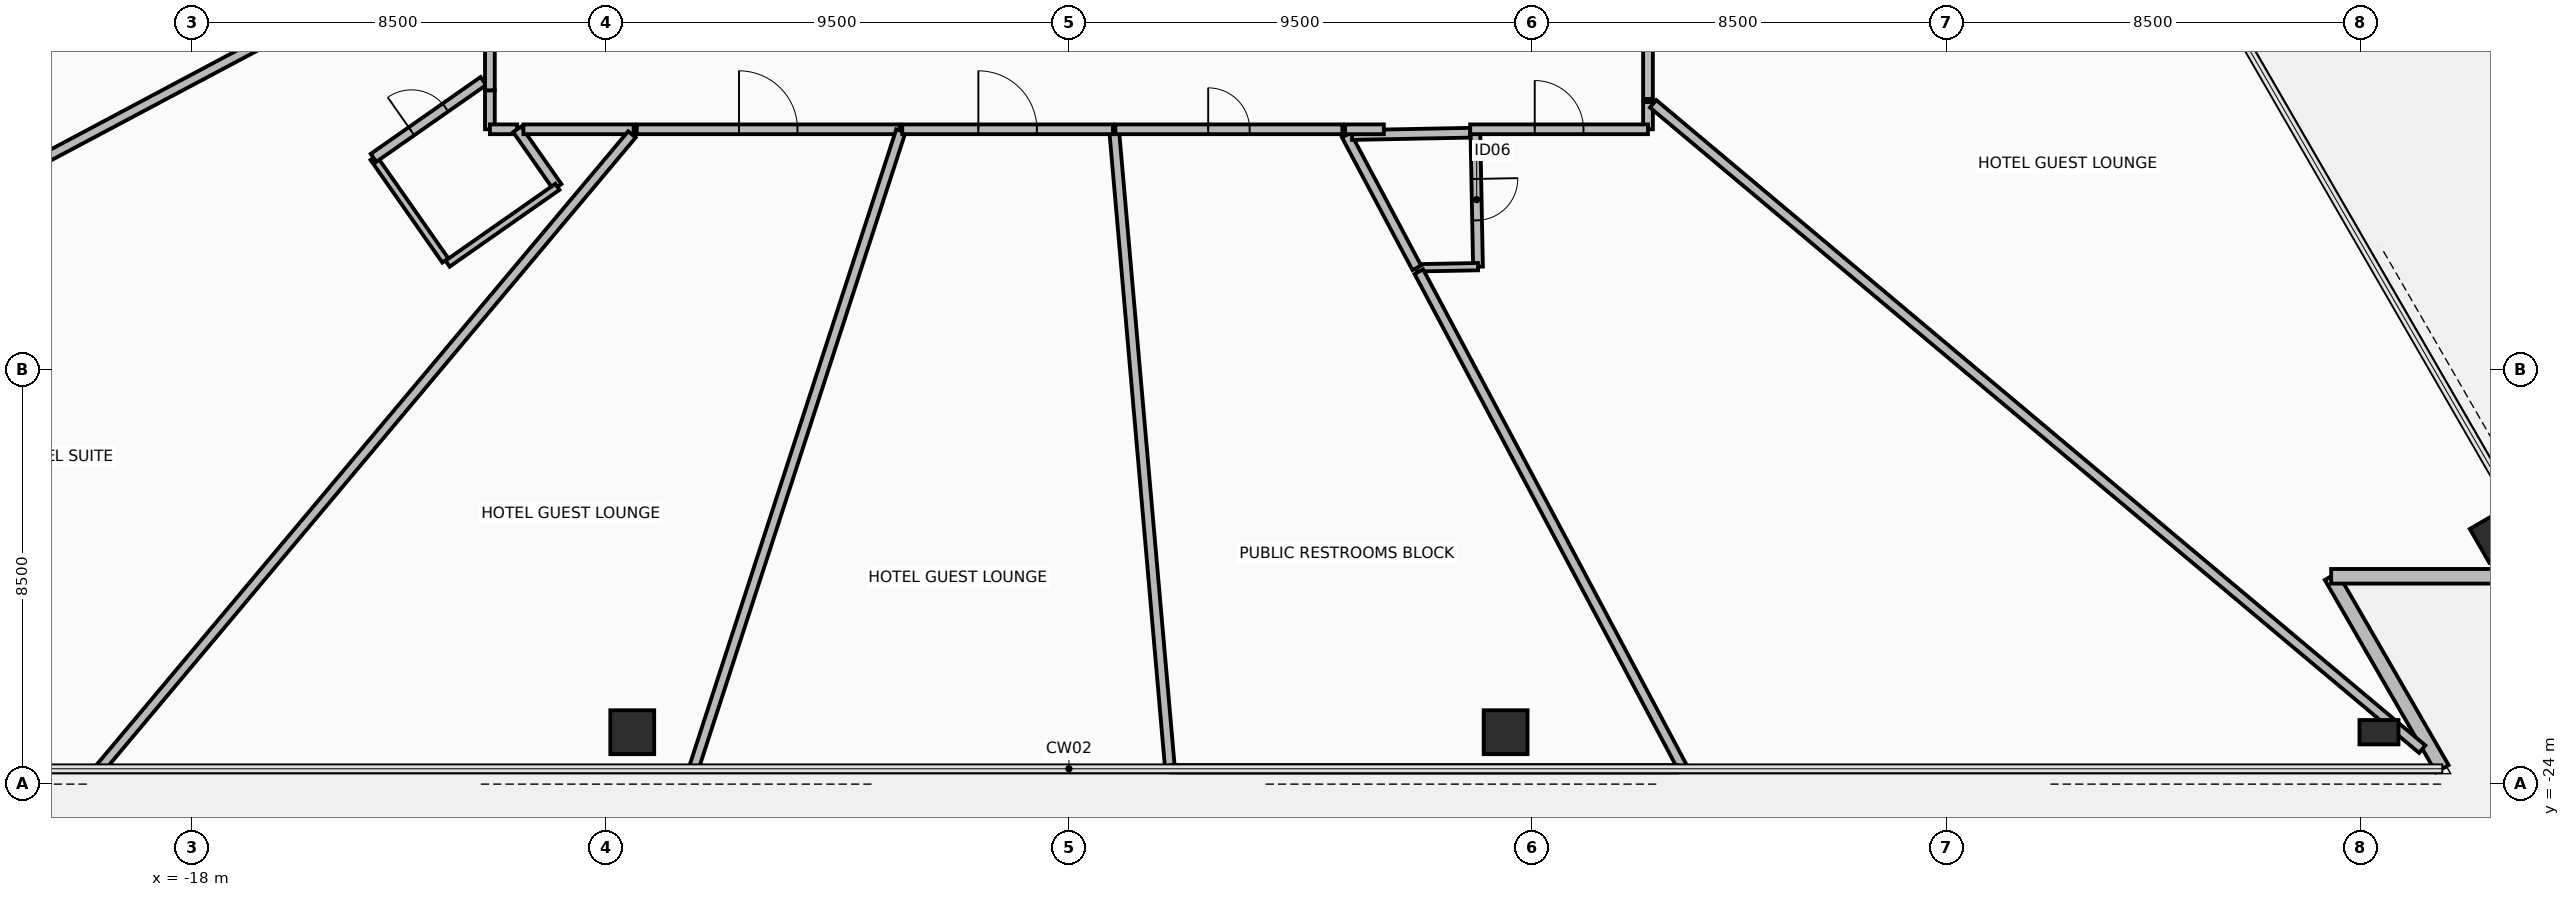
"""IFC4 building model, lengths in metres.
Left out: names, types, materials, properties, quantities, classifications, styles, units other than length and angle.
Written with IfcOpenShell. Run it as: python <this file> out.ifc"""

import sys

from ifc_helpers import new_model, si_unit, direction, frame, frame_2d, origin, origin_2d, place, context, subcontext, project, spatial, rectangle, hollow_rectangle, extrude, element, fill, save


model = new_model("IFC4")
c1 = context("Model", 3, precision=1e-05, world=origin(), true_north=direction((0.0, 1.0)))
c2 = subcontext(c1, "Body", "Model", "MODEL_VIEW")
j1 = project(units=[si_unit("LENGTHUNIT", "METRE"), si_unit("PLANEANGLEUNIT", "RADIAN")], contexts=[c1])
p1 = place(None, origin())
s1 = spatial("IfcSite", under=j1, at=p1, CompositionType="ELEMENT")
p2 = place(p1, origin())
s2 = spatial("IfcBuilding", under=s1, at=p2, CompositionType="ELEMENT")
p3 = place(p2, frame((0.0, 0.0, 31.8)))
s3 = spatial("IfcBuildingStorey", under=s2, at=p3, CompositionType="ELEMENT", Elevation=31.8)
for number, where, z_axis, x_axis in (
    (1, (-8.959, -22.95, 0.0), (0.0, 0.0, 1.0), (1.0, 0.0, 0.0)),
    (2, (8.959, -22.95, 0.0), (0.0, 0.0, 1.0), (1.0, 0.0, 0.0)),
):
    element("IfcColumn", number, at=place(p3, frame(where, z_axis=z_axis, x_axis=x_axis)), inside=s3, PredefinedType="COLUMN", context=c2, shape_type="SweptSolid", body=[
        extrude(hollow_rectangle(XDim=0.9, YDim=0.9, WallThickness=0.05, at=origin_2d()), origin(), (0.0, 0.0, 1.0), 3.45),
    ])
for number, where, z_axis, x_axis in (
    (3, (26.877, -22.95, 0.0), (0.0, 0.0, 1.0), (1.0, 0.0, 0.0)),
    (4, (29.157, -19.001, 0.0), (0.0, 0.0, 1.0), (-0.5, 0.866, 0.0)),
):
    element("IfcColumn", number, at=place(p3, frame(where, z_axis=z_axis, x_axis=x_axis)), inside=s3, PredefinedType="COLUMN", context=c2, shape_type="SweptSolid", body=[
        extrude(hollow_rectangle(XDim=0.5, YDim=0.8, WallThickness=0.04, at=origin_2d()), origin(), (0.0, 0.0, 1.0), 3.45),
    ])
p4 = place(p3, frame((-3.8, 26.418, 0.0), z_axis=(0.0, 0.0, 1.0), x_axis=(-0.499999546436, -0.86602566565, 0.0)))
e5 = element("IfcWall", 5, at=p4, inside=s3, PredefinedType="STANDARD", context=c2, shape_type="SweptSolid", body=[
    extrude(rectangle(XDim=53.312, YDim=0.3, at=frame_2d((26.656, 0.0))), origin(), (0.0, 0.0, 1.0), 3.275),
])
p5 = place(p4, frame((25.756, 0.0, 0.0)))
e6 = element("IfcOpeningElement", 6, at=p5, cuts=e5, PredefinedType="OPENING", context=c2, shape_type="SweptSolid", body=[
    extrude(rectangle(XDim=1.8, YDim=2.3, at=frame_2d((0.9, 1.15))), frame((0.0, 0.16, 0.0), z_axis=(0.0, -1.0, 0.0), x_axis=(1.0, 0.0, 0.0)), (0.0, 0.0, 1.0), 0.32),
])
p6 = place(p4, frame((12.578, 0.0, 0.85)))
e7 = element("IfcOpeningElement", 7, at=p6, cuts=e5, PredefinedType="OPENING", context=c2, shape_type="SweptSolid", body=[
    extrude(rectangle(XDim=1.5, YDim=2.1, at=frame_2d((0.75, 1.05))), frame((0.0, 0.16, 0.0), z_axis=(0.0, -1.0, 0.0), x_axis=(1.0, 0.0, 0.0)), (0.0, 0.0, 1.0), 0.32),
])
p7 = place(p4, frame((39.234, 0.0, 0.85)))
e8 = element("IfcOpeningElement", 8, at=p7, cuts=e5, PredefinedType="OPENING", context=c2, shape_type="SweptSolid", body=[
    extrude(rectangle(XDim=1.5, YDim=2.1, at=frame_2d((0.75, 1.05))), frame((0.0, 0.16, 0.0), z_axis=(0.0, -1.0, 0.0), x_axis=(1.0, 0.0, 0.0)), (0.0, 0.0, 1.0), 0.32),
])
p8 = place(p3, frame((28.176, -23.7, 0.0), z_axis=(0.0, 0.0, 1.0), x_axis=(-0.500014431597, 0.866017071537, 0.0)))
e9 = element("IfcWall", 9, at=p8, inside=s3, PredefinedType="STANDARD", context=c2, shape_type="SweptSolid", body=[
    extrude(rectangle(XDim=4.56, YDim=0.3, at=frame_2d((2.28, 0.0))), origin(), (0.0, 0.0, 1.0), 2.47),
])
p9 = place(p3, frame((25.896, -19.751, 0.0), z_axis=(0.0, 0.0, 1.0), x_axis=(1.0, 0.0, 0.0)))
e10 = element("IfcWall", 10, at=p9, inside=s3, PredefinedType="STANDARD", context=c2, shape_type="SweptSolid", body=[
    extrude(rectangle(XDim=4.56, YDim=0.3, at=frame_2d((2.28, 0.0))), origin(), (0.0, 0.0, 1.0), 2.47),
])
p10 = place(p3, frame((-11.88, -9.78, 0.0), z_axis=(0.0, 0.0, 1.0), x_axis=(0.0, -1.0, 0.0)))
e11 = element("IfcWall", 11, at=p10, inside=s3, PredefinedType="PARTITIONING", context=c2, shape_type="SweptSolid", body=[
    extrude(rectangle(XDim=0.8, YDim=0.2, at=frame_2d((0.4, 0.0))), origin(), (0.0, 0.0, 1.0), 2.67),
])
p11 = place(p3, frame((-11.879, -10.58, 0.0), z_axis=(0.0, 0.0, 1.0), x_axis=(1.0, 0.0, 0.0)))
e12 = element("IfcWall", 12, at=p11, inside=s3, PredefinedType="PARTITIONING", context=c2, shape_type="SweptSolid", body=[
    extrude(rectangle(XDim=0.559, YDim=0.2, at=frame_2d((0.28, 0.0))), origin(), (0.0, 0.0, 1.0), 3.275),
])
p12 = place(p3, frame((-11.32, -10.58, 0.0), z_axis=(0.0, 0.0, 1.0), x_axis=(0.573177949093, -0.819430923674, 0.0)))
e13 = element("IfcWall", 13, at=p12, inside=s3, PredefinedType="PARTITIONING", context=c2, shape_type="SweptSolid", body=[
    extrude(rectangle(XDim=1.44, YDim=0.2, at=frame_2d((0.72, 0.0))), origin(), (0.0, 0.0, 1.0), 3.275),
])
p13 = place(p3, frame((-10.494, -11.76, 0.0), z_axis=(0.0, 0.0, 1.0), x_axis=(-0.819398712469, -0.573223996361, 0.0)))
e14 = element("IfcWall", 14, at=p13, inside=s3, PredefinedType="PARTITIONING", context=c2, shape_type="SweptSolid", body=[
    extrude(rectangle(XDim=2.75, YDim=0.15, at=frame_2d((1.375, 0.0))), origin(), (0.0, 0.0, 1.0), 3.275),
])
p14 = place(p3, frame((-12.794, -13.271, 0.0), z_axis=(0.0, 0.0, 1.0), x_axis=(-0.573130756233, 0.819463932251, 0.0)))
e15 = element("IfcWall", 15, at=p14, inside=s3, PredefinedType="PARTITIONING", context=c2, shape_type="SweptSolid", body=[
    extrude(rectangle(XDim=2.57, YDim=0.15, at=frame_2d((1.285, 0.0))), origin(), (0.0, 0.0, 1.0), 2.67),
])
p15 = place(p3, frame((-14.267, -11.165, 0.0), z_axis=(0.0, 0.0, 1.0), x_axis=(0.81944041023, 0.573164386614, 0.0)))
e16 = element("IfcWall", 16, at=p15, inside=s3, PredefinedType="PARTITIONING", context=c2, shape_type="SweptSolid", body=[
    extrude(rectangle(XDim=2.75, YDim=0.2, at=frame_2d((1.375, 0.0))), origin(), (0.0, 0.0, 1.0), 2.67),
])
p16 = place(p15, frame((0.95, 0.0, 0.0)))
e17 = element("IfcOpeningElement", 17, at=p16, cuts=e16, PredefinedType="OPENING", context=c2, shape_type="SweptSolid", body=[
    extrude(rectangle(XDim=0.85, YDim=2.1, at=frame_2d((0.425, 1.05))), frame((0.0, 0.11, 0.0), z_axis=(0.0, -1.0, 0.0), x_axis=(1.0, 0.0, 0.0)), (0.0, 0.0, 1.0), 0.22),
])
p17 = place(p3, frame((8.339, -10.649, 0.0), z_axis=(0.0, 0.0, 1.0), x_axis=(0.019353504647, -0.999812703389, 0.0)))
e18 = element("IfcWall", 18, at=p17, inside=s3, PredefinedType="PARTITIONING", context=c2, shape_type="SweptSolid", body=[
    extrude(rectangle(XDim=2.75, YDim=0.2, at=frame_2d((1.375, 0.0))), origin(), (0.0, 0.0, 1.0), 3.275),
])
p18 = place(p17, frame((0.95, 0.0, 0.0)))
e19 = element("IfcOpeningElement", 19, at=p18, cuts=e18, PredefinedType="OPENING", context=c2, shape_type="SweptSolid", body=[
    extrude(rectangle(XDim=0.85, YDim=2.1, at=frame_2d((0.425, 1.05))), frame((0.0, 0.11, 0.0), z_axis=(0.0, -1.0, 0.0), x_axis=(1.0, 0.0, 0.0)), (0.0, 0.0, 1.0), 0.22),
])
p19 = place(p3, frame((8.392, -13.398, 0.0), z_axis=(0.0, 0.0, 1.0), x_axis=(-0.999810947385, -0.01944400909, 0.0)))
e20 = element("IfcWall", 20, at=p19, inside=s3, PredefinedType="PARTITIONING", context=c2, shape_type="SweptSolid", body=[
    extrude(rectangle(XDim=1.256, YDim=0.15, at=frame_2d((0.628, 0.0))), origin(), (0.0, 0.0, 1.0), 3.275),
])
p20 = place(p3, frame((7.137, -13.423, 0.0), z_axis=(0.0, 0.0, 1.0), x_axis=(-0.46943307166, 0.882968057877, 0.0)))
e21 = element("IfcWall", 21, at=p20, inside=s3, PredefinedType="PARTITIONING", context=c2, shape_type="SweptSolid", body=[
    extrude(rectangle(XDim=3.083, YDim=0.2, at=frame_2d((1.542, 0.0))), origin(), (0.0, 0.0, 1.0), 3.275),
])
p21 = place(p3, frame((5.807, -10.698, 0.0), z_axis=(0.0, 0.0, 1.0), x_axis=(0.999811590966, 0.019410887945, 0.0)))
e22 = element("IfcWall", 22, at=p21, inside=s3, PredefinedType="PARTITIONING", context=c2, shape_type="SweptSolid", body=[
    extrude(rectangle(XDim=2.427, YDim=0.2, at=frame_2d((1.214, 0.0))), origin(), (0.0, 0.0, 1.0), 3.275),
])
p22 = place(p3, frame((-11.893, -6.324, 0.0), z_axis=(0.0, 0.0, 1.0), x_axis=(-0.882947372325, -0.46947197755, 0.0)))
e23 = element("IfcWall", 23, at=p22, inside=s3, PredefinedType="PARTITIONING", context=c2, shape_type="SweptSolid", body=[
    extrude(rectangle(XDim=17.374, YDim=0.2, at=frame_2d((8.687, 0.0))), origin(), (0.0, 0.0, 1.0), 2.47),
])
p23 = place(p3, frame((2.072, -23.677, 0.0), z_axis=(0.0, 0.0, 1.0), x_axis=(-0.087161179376, 0.996194222433, 0.0)))
e24 = element("IfcWall", 24, at=p23, inside=s3, PredefinedType="PARTITIONING", context=c2, shape_type="SweptSolid", body=[
    extrude(rectangle(XDim=13.12, YDim=0.2, at=frame_2d((6.56, 0.0))), origin(), (0.0, 0.0, 1.0), 2.47),
])
p24 = place(p3, frame((0.953, -10.58, 0.0), z_axis=(0.0, 0.0, 1.0), x_axis=(1.0, 0.0, 0.0)))
e25 = element("IfcWall", 25, at=p24, inside=s3, PredefinedType="PARTITIONING", context=c2, shape_type="SweptSolid", body=[
    extrude(rectangle(XDim=4.658, YDim=0.2, at=frame_2d((2.329, 0.0))), origin(), (0.0, 0.0, 1.0), 3.275),
])
p25 = place(p24, frame((1.904, 0.0, 0.0)))
e26 = element("IfcOpeningElement", 26, at=p25, cuts=e25, PredefinedType="OPENING", context=c2, shape_type="SweptSolid", body=[
    extrude(rectangle(XDim=0.85, YDim=2.1, at=frame_2d((0.425, 1.05))), frame((0.0, 0.11, 0.0), z_axis=(0.0, -1.0, 0.0), x_axis=(1.0, 0.0, 0.0)), (0.0, 0.0, 1.0), 0.22),
])
p26 = place(p3, frame((7.179, -13.502, 0.0), z_axis=(0.0, 0.0, 1.0), x_axis=(0.469478708188, -0.882943793544, 0.0)))
e27 = element("IfcWall", 27, at=p26, inside=s3, PredefinedType="PARTITIONING", context=c2, shape_type="SweptSolid", body=[
    extrude(rectangle(XDim=11.55, YDim=0.2, at=frame_2d((5.775, 0.0))), origin(), (0.0, 0.0, 1.0), 2.47),
])
p27 = place(p3, frame((12.483, -23.7, 0.0), z_axis=(0.0, 0.0, 1.0), x_axis=(-1.0, 0.0, 0.0)))
e28 = element("IfcWall", 28, at=p27, inside=s3, PredefinedType="PARTITIONING", context=c2, shape_type="SweptSolid", body=[
    extrude(rectangle(XDim=10.386, YDim=0.15, at=frame_2d((5.193, 0.0))), origin(), (0.0, 0.0, 1.0), 3.275),
])
p28 = place(p3, frame((-11.88, -6.436, 0.0), z_axis=(0.0, 0.0, 1.0), x_axis=(0.0, -1.0, 0.0)))
e29 = element("IfcWall", 29, at=p28, inside=s3, PredefinedType="PARTITIONING", context=c2, shape_type="SweptSolid", body=[
    extrude(rectangle(XDim=3.344, YDim=0.2, at=frame_2d((1.672, 0.0))), origin(), (0.0, 0.0, 1.0), 2.67),
])
p29 = place(p28, frame((1.172, 0.0, 0.0)))
e30 = element("IfcOpeningElement", 30, at=p29, cuts=e29, PredefinedType="OPENING", context=c2, shape_type="SweptSolid", body=[
    extrude(rectangle(XDim=1.0, YDim=2.15, at=frame_2d((0.5, 1.075))), frame((0.0, 0.11, 0.0), z_axis=(0.0, -1.0, 0.0), x_axis=(1.0, 0.0, 0.0)), (0.0, 0.0, 1.0), 0.22),
])
p30 = place(p3, frame((-11.192, -10.58, 0.0), z_axis=(0.0, 0.0, 1.0), x_axis=(1.0, 0.0, 0.0)))
e31 = element("IfcWall", 31, at=p30, inside=s3, PredefinedType="PARTITIONING", context=c2, shape_type="SweptSolid", body=[
    extrude(rectangle(XDim=2.26, YDim=0.2, at=frame_2d((1.13, 0.0))), origin(), (0.0, 0.0, 1.0), 2.67),
])
p31 = place(p3, frame((-8.966, -10.685, 0.0), z_axis=(0.0, 0.0, 1.0), x_axis=(-0.642784617016, -0.766046954258, 0.0)))
e32 = element("IfcWall", 32, at=p31, inside=s3, PredefinedType="PARTITIONING", context=c2, shape_type="SweptSolid", body=[
    extrude(rectangle(XDim=16.978, YDim=0.2, at=frame_2d((8.489, 0.0))), origin(), (0.0, 0.0, 1.0), 2.47),
])
p32 = place(p3, frame((-8.866, -10.58, 0.0), z_axis=(0.0, 0.0, 1.0), x_axis=(1.0, 0.0, 0.0)))
e33 = element("IfcWall", 33, at=p32, inside=s3, PredefinedType="PARTITIONING", context=c2, shape_type="SweptSolid", body=[
    extrude(rectangle(XDim=5.394, YDim=0.2, at=frame_2d((2.697, 0.0))), origin(), (0.0, 0.0, 1.0), 2.67),
])
p33 = place(p32, frame((2.097, 0.0, 0.0)))
e34 = element("IfcOpeningElement", 34, at=p33, cuts=e33, PredefinedType="OPENING", context=c2, shape_type="SweptSolid", body=[
    extrude(rectangle(XDim=1.2, YDim=2.15, at=frame_2d((0.6, 1.075))), frame((0.0, 0.11, 0.0), z_axis=(0.0, -1.0, 0.0), x_axis=(1.0, 0.0, 0.0)), (0.0, 0.0, 1.0), 0.22),
])
p34 = place(p3, frame((-3.448, -10.613, 0.0), z_axis=(0.0, 0.0, 1.0), x_axis=(-0.309029029702, -0.951052605696, 0.0)))
e35 = element("IfcWall", 35, at=p34, inside=s3, PredefinedType="PARTITIONING", context=c2, shape_type="SweptSolid", body=[
    extrude(rectangle(XDim=13.742, YDim=0.2, at=frame_2d((6.871, 0.0))), origin(), (0.0, 0.0, 1.0), 2.47),
])
p35 = place(p3, frame((-3.419, -10.58, 0.0), z_axis=(0.0, 0.0, 1.0), x_axis=(1.0, 0.0, 0.0)))
e36 = element("IfcWall", 36, at=p35, inside=s3, PredefinedType="PARTITIONING", context=c2, shape_type="SweptSolid", body=[
    extrude(rectangle(XDim=4.322, YDim=0.2, at=frame_2d((2.161, 0.0))), origin(), (0.0, 0.0, 1.0), 3.275),
])
p36 = place(p35, frame((1.561, 0.0, 0.0)))
e37 = element("IfcOpeningElement", 37, at=p36, cuts=e36, PredefinedType="OPENING", context=c2, shape_type="SweptSolid", body=[
    extrude(rectangle(XDim=1.2, YDim=2.15, at=frame_2d((0.6, 1.075))), frame((0.0, 0.11, 0.0), z_axis=(0.0, -1.0, 0.0), x_axis=(1.0, 0.0, 0.0)), (0.0, 0.0, 1.0), 0.22),
])
p37 = place(p3, frame((11.88, -10.579, 0.0), z_axis=(0.0, 0.0, 1.0), x_axis=(0.0, 1.0, 0.0)))
e38 = element("IfcWall", 38, at=p37, inside=s3, PredefinedType="PARTITIONING", context=c2, shape_type="SweptSolid", body=[
    extrude(rectangle(XDim=0.557, YDim=0.2, at=frame_2d((0.279, 0.0))), origin(), (0.0, 0.0, 1.0), 2.67),
])
p38 = place(p3, frame((11.985, -10.057, 0.0), z_axis=(0.0, 0.0, 1.0), x_axis=(0.766043557541, -0.642788665076, 0.0)))
e39 = element("IfcWall", 39, at=p38, inside=s3, PredefinedType="PARTITIONING", context=c2, shape_type="SweptSolid", body=[
    extrude(rectangle(XDim=20.598, YDim=0.2, at=frame_2d((10.299, 0.0))), origin(), (0.0, 0.0, 1.0), 2.47),
])
p39 = place(p3, frame((5.667, -10.58, 0.0), z_axis=(0.0, 0.0, 1.0), x_axis=(1.0, 0.0, 0.0)))
e40 = element("IfcWall", 40, at=p39, inside=s3, PredefinedType="PARTITIONING", context=c2, shape_type="SweptSolid", body=[
    extrude(rectangle(XDim=0.793, YDim=0.2, at=frame_2d((0.396, 0.0))), origin(), (0.0, 0.0, 1.0), 3.275),
])
p40 = place(p3, frame((8.232, -10.58, 0.0), z_axis=(0.0, 0.0, 1.0), x_axis=(1.0, 0.0, 0.0)))
e41 = element("IfcWall", 41, at=p40, inside=s3, PredefinedType="PARTITIONING", context=c2, shape_type="SweptSolid", body=[
    extrude(rectangle(XDim=3.647, YDim=0.2, at=frame_2d((1.823, 0.0))), origin(), (0.0, 0.0, 1.0), 2.67),
])
p41 = place(p40, frame((1.324, 0.0, 0.0)))
e42 = element("IfcOpeningElement", 42, at=p41, cuts=e41, PredefinedType="OPENING", context=c2, shape_type="SweptSolid", body=[
    extrude(rectangle(XDim=1.0, YDim=2.15, at=frame_2d((0.5, 1.075))), frame((0.0, 0.11, 0.0), z_axis=(0.0, -1.0, 0.0), x_axis=(1.0, 0.0, 0.0)), (0.0, 0.0, 1.0), 0.22),
])
p42 = place(p3, frame((11.88, -9.957, 0.0), z_axis=(0.0, 0.0, 1.0), x_axis=(0.0, 1.0, 0.0)))
e43 = element("IfcWall", 43, at=p42, inside=s3, PredefinedType="PARTITIONING", context=c2, shape_type="SweptSolid", body=[
    extrude(rectangle(XDim=6.062, YDim=0.2, at=frame_2d((3.031, 0.0))), origin(), (0.0, 0.0, 1.0), 2.67),
])
p43 = place(p42, frame((2.431, 0.0, 0.0)))
e44 = element("IfcOpeningElement", 44, at=p43, cuts=e43, PredefinedType="OPENING", context=c2, shape_type="SweptSolid", body=[
    extrude(rectangle(XDim=1.2, YDim=2.15, at=frame_2d((0.6, 1.075))), frame((0.0, 0.11, 0.0), z_axis=(0.0, -1.0, 0.0), x_axis=(1.0, 0.0, 0.0)), (0.0, 0.0, 1.0), 0.22),
])
p44 = place(p16, origin())
e45 = element("IfcDoor", 45, at=p44, inside=s3, OperationType="SINGLE_SWING_RIGHT", PredefinedType="DOOR", context=c2, shape_type="SweptSolid", body=[
    extrude(rectangle(XDim=0.85, YDim=2.1, at=frame_2d((0.425, 1.05))), frame((0.0, 0.025, 0.0), z_axis=(0.0, -1.0, 0.0), x_axis=(1.0, 0.0, 0.0)), (0.0, 0.0, 1.0), 0.05),
])
fill(e17, e45)
p45 = place(p18, origin())
e46 = element("IfcDoor", 46, at=p45, inside=s3, OperationType="SINGLE_SWING_RIGHT", PredefinedType="DOOR", context=c2, shape_type="SweptSolid", body=[
    extrude(rectangle(XDim=0.85, YDim=2.1, at=frame_2d((0.425, 1.05))), frame((0.0, 0.025, 0.0), z_axis=(0.0, -1.0, 0.0), x_axis=(1.0, 0.0, 0.0)), (0.0, 0.0, 1.0), 0.05),
])
fill(e19, e46)
p46 = place(p25, origin())
e47 = element("IfcDoor", 47, at=p46, inside=s3, OperationType="SINGLE_SWING_RIGHT", PredefinedType="DOOR", context=c2, shape_type="SweptSolid", body=[
    extrude(rectangle(XDim=0.85, YDim=2.1, at=frame_2d((0.425, 1.05))), frame((0.0, 0.025, 0.0), z_axis=(0.0, -1.0, 0.0), x_axis=(1.0, 0.0, 0.0)), (0.0, 0.0, 1.0), 0.05),
])
fill(e26, e47)
p47 = place(p33, origin())
e48 = element("IfcDoor", 48, at=p47, inside=s3, OperationType="SINGLE_SWING_LEFT", PredefinedType="DOOR", context=c2, shape_type="SweptSolid", body=[
    extrude(rectangle(XDim=1.2, YDim=2.15, at=frame_2d((0.6, 1.075))), frame((0.0, 0.025, 0.0), z_axis=(0.0, -1.0, 0.0), x_axis=(1.0, 0.0, 0.0)), (0.0, 0.0, 1.0), 0.05),
])
fill(e34, e48)
p48 = place(p36, origin())
e49 = element("IfcDoor", 49, at=p48, inside=s3, OperationType="SINGLE_SWING_LEFT", PredefinedType="DOOR", context=c2, shape_type="SweptSolid", body=[
    extrude(rectangle(XDim=1.2, YDim=2.15, at=frame_2d((0.6, 1.075))), frame((0.0, 0.025, 0.0), z_axis=(0.0, -1.0, 0.0), x_axis=(1.0, 0.0, 0.0)), (0.0, 0.0, 1.0), 0.05),
])
fill(e37, e49)
p49 = place(p41, origin())
e50 = element("IfcDoor", 50, at=p49, inside=s3, OperationType="SINGLE_SWING_LEFT", PredefinedType="DOOR", context=c2, shape_type="SweptSolid", body=[
    extrude(rectangle(XDim=1.0, YDim=2.15, at=frame_2d((0.5, 1.075))), frame((0.0, 0.025, 0.0), z_axis=(0.0, -1.0, 0.0), x_axis=(1.0, 0.0, 0.0)), (0.0, 0.0, 1.0), 0.05),
])
fill(e42, e50)
save(model, sys.argv[1])
